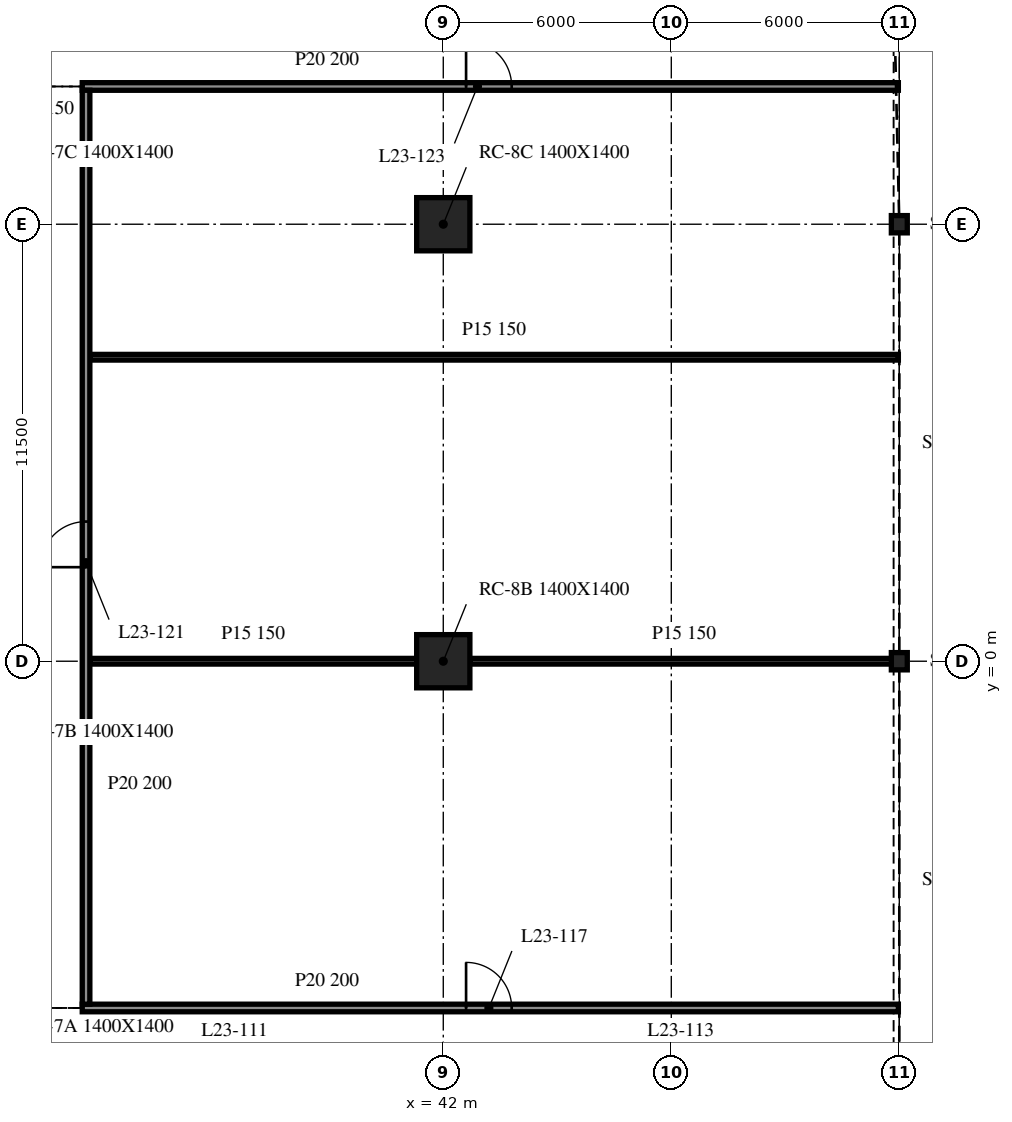
"""IFC4 building model, lengths in metres.
Left out: names, types, materials, properties, quantities, classifications, styles, units other than length and angle.
Written with IfcOpenShell. Run it as: python <this file> out.ifc"""

import sys

from ifc_helpers import new_model, si_unit, direction, frame, frame_2d, origin, origin_2d, place, context, subcontext, project, spatial, rectangle, i_section, extrude, element, fill, save


model = new_model("IFC4")
c1 = context("Model", 3, precision=1e-05, world=origin(), true_north=direction((0.0, 1.0)))
c2 = subcontext(c1, "Body", "Model", "MODEL_VIEW")
j1 = project(units=[si_unit("LENGTHUNIT", "METRE"), si_unit("PLANEANGLEUNIT", "RADIAN")], contexts=[c1])
p1 = place(None, origin())
s1 = spatial("IfcSite", under=j1, at=p1, CompositionType="ELEMENT")
p2 = place(p1, origin())
s2 = spatial("IfcBuilding", under=s1, at=p2, CompositionType="ELEMENT")
p3 = place(p2, frame((0.0, 0.0, 101.2)))
s3 = spatial("IfcBuildingStorey", under=s2, at=p3, CompositionType="ELEMENT", Elevation=101.2)
for number, where, z_axis, x_axis in (
    (1, (42.0, 0.0, -0.34), (0.0, 0.0, 1.0), (1.0, 0.0, 0.0)),
    (2, (42.0, 11.5, -0.34), (0.0, 0.0, 1.0), (1.0, 0.0, 0.0)),
):
    element("IfcColumn", number, at=place(p3, frame(where, z_axis=z_axis, x_axis=x_axis)), inside=s3, PredefinedType="COLUMN", context=c2, shape_type="SweptSolid", body=[
        extrude(rectangle(XDim=1.4, YDim=1.4, at=origin_2d()), origin(), (0.0, 0.0, 1.0), 4.1),
    ])
for number, where, z_axis, x_axis in (
    (3, (54.0, 0.0, -0.34), (0.0, 0.0, 1.0), (1.0, 0.0, 0.0)),
    (4, (54.0, 11.5, -0.34), (0.0, 0.0, 1.0), (1.0, 0.0, 0.0)),
):
    element("IfcColumn", number, at=place(p3, frame(where, z_axis=z_axis, x_axis=x_axis)), inside=s3, PredefinedType="COLUMN", context=c2, shape_type="SweptSolid", body=[
        extrude(i_section(OverallWidth=0.419, OverallDepth=0.455, WebThickness=0.042, FlangeThickness=0.068, at=origin_2d()), origin(), (0.0, 0.0, 1.0), 4.1),
    ])
p4 = place(p3, frame((32.5, -9.125, 0.0), z_axis=(0.0, 0.0, 1.0), x_axis=(1.0, 0.0, 0.0)))
e5 = element("IfcWall", 5, at=p4, inside=s3, PredefinedType="PARTITIONING", context=c2, shape_type="SweptSolid", body=[
    extrude(rectangle(XDim=21.475, YDim=0.2, at=frame_2d((10.738, 0.0))), origin(), (0.0, 0.0, 1.0), 3.76),
])
p5 = place(p4, frame((10.1, 0.0, 0.0)))
e6 = element("IfcOpeningElement", 6, at=p5, cuts=e5, PredefinedType="OPENING", context=c2, shape_type="SweptSolid", body=[
    extrude(rectangle(XDim=1.2, YDim=2.1, at=frame_2d((0.6, 1.05))), frame((0.0, 0.11, 0.0), z_axis=(0.0, -1.0, 0.0), x_axis=(1.0, 0.0, 0.0)), (0.0, 0.0, 1.0), 0.22),
])
p6 = place(p3, frame((32.7, 0.0, 0.0), z_axis=(0.0, 0.0, 1.0), x_axis=(1.0, 0.0, 0.0)))
e7 = element("IfcWall", 7, at=p6, inside=s3, PredefinedType="PARTITIONING", context=c2, shape_type="SweptSolid", body=[
    extrude(rectangle(XDim=8.6, YDim=0.15, at=frame_2d((4.3, 0.0))), origin(), (0.0, 0.0, 1.0), 3.76),
])
p7 = place(p3, frame((42.7, 0.0, 0.0), z_axis=(0.0, 0.0, 1.0), x_axis=(1.0, 0.0, 0.0)))
e8 = element("IfcWall", 8, at=p7, inside=s3, PredefinedType="PARTITIONING", context=c2, shape_type="SweptSolid", body=[
    extrude(rectangle(XDim=11.275, YDim=0.15, at=frame_2d((5.638, 0.0))), origin(), (0.0, 0.0, 1.0), 3.76),
])
p8 = place(p3, frame((32.7, 8.0, 0.0), z_axis=(0.0, 0.0, 1.0), x_axis=(1.0, 0.0, 0.0)))
e9 = element("IfcWall", 9, at=p8, inside=s3, PredefinedType="PARTITIONING", context=c2, shape_type="SweptSolid", body=[
    extrude(rectangle(XDim=21.275, YDim=0.15, at=frame_2d((10.638, 0.0))), origin(), (0.0, 0.0, 1.0), 3.76),
])
p9 = place(p3, frame((32.5, 15.125, 0.0), z_axis=(0.0, 0.0, 1.0), x_axis=(1.0, 0.0, 0.0)))
e10 = element("IfcWall", 10, at=p9, inside=s3, PredefinedType="PARTITIONING", context=c2, shape_type="SweptSolid", body=[
    extrude(rectangle(XDim=21.475, YDim=0.2, at=frame_2d((10.738, 0.0))), origin(), (0.0, 0.0, 1.0), 3.76),
])
p10 = place(p9, frame((10.1, 0.0, 0.0)))
e11 = element("IfcOpeningElement", 11, at=p10, cuts=e10, PredefinedType="OPENING", context=c2, shape_type="SweptSolid", body=[
    extrude(rectangle(XDim=1.2, YDim=2.1, at=frame_2d((0.6, 1.05))), frame((0.0, 0.11, 0.0), z_axis=(0.0, -1.0, 0.0), x_axis=(1.0, 0.0, 0.0)), (0.0, 0.0, 1.0), 0.22),
])
p11 = place(p3, frame((32.6, -9.025, 0.0), z_axis=(0.0, 0.0, 1.0), x_axis=(0.0, 1.0, 0.0)))
e12 = element("IfcWall", 12, at=p11, inside=s3, PredefinedType="PARTITIONING", context=c2, shape_type="SweptSolid", body=[
    extrude(rectangle(XDim=24.05, YDim=0.2, at=frame_2d((12.025, 0.0))), origin(), (0.0, 0.0, 1.0), 3.76),
])
p12 = place(p11, frame((11.5, 0.0, 0.0)))
e13 = element("IfcOpeningElement", 13, at=p12, cuts=e12, PredefinedType="OPENING", context=c2, shape_type="SweptSolid", body=[
    extrude(rectangle(XDim=1.2, YDim=2.1, at=frame_2d((0.6, 1.05))), frame((0.0, 0.11, 0.0), z_axis=(0.0, -1.0, 0.0), x_axis=(1.0, 0.0, 0.0)), (0.0, 0.0, 1.0), 0.22),
])
p13 = place(p5, origin())
e14 = element("IfcDoor", 14, at=p13, inside=s3, OperationType="SINGLE_SWING_RIGHT", PredefinedType="DOOR", context=c2, shape_type="SweptSolid", body=[
    extrude(rectangle(XDim=1.2, YDim=2.1, at=frame_2d((0.6, 1.05))), frame((0.0, 0.025, 0.0), z_axis=(0.0, -1.0, 0.0), x_axis=(1.0, 0.0, 0.0)), (0.0, 0.0, 1.0), 0.05),
])
fill(e6, e14)
p14 = place(p12, origin())
e15 = element("IfcDoor", 15, at=p14, inside=s3, OperationType="SINGLE_SWING_LEFT", PredefinedType="DOOR", context=c2, shape_type="SweptSolid", body=[
    extrude(rectangle(XDim=1.2, YDim=2.1, at=frame_2d((0.6, 1.05))), frame((0.0, 0.025, 0.0), z_axis=(0.0, -1.0, 0.0), x_axis=(1.0, 0.0, 0.0)), (0.0, 0.0, 1.0), 0.05),
])
fill(e13, e15)
p15 = place(p10, origin())
e16 = element("IfcDoor", 16, at=p15, inside=s3, OperationType="SINGLE_SWING_LEFT", PredefinedType="DOOR", context=c2, shape_type="SweptSolid", body=[
    extrude(rectangle(XDim=1.2, YDim=2.1, at=frame_2d((0.6, 1.05))), frame((0.0, 0.025, 0.0), z_axis=(0.0, -1.0, 0.0), x_axis=(1.0, 0.0, 0.0)), (0.0, 0.0, 1.0), 0.05),
])
fill(e11, e16)
save(model, sys.argv[1])
